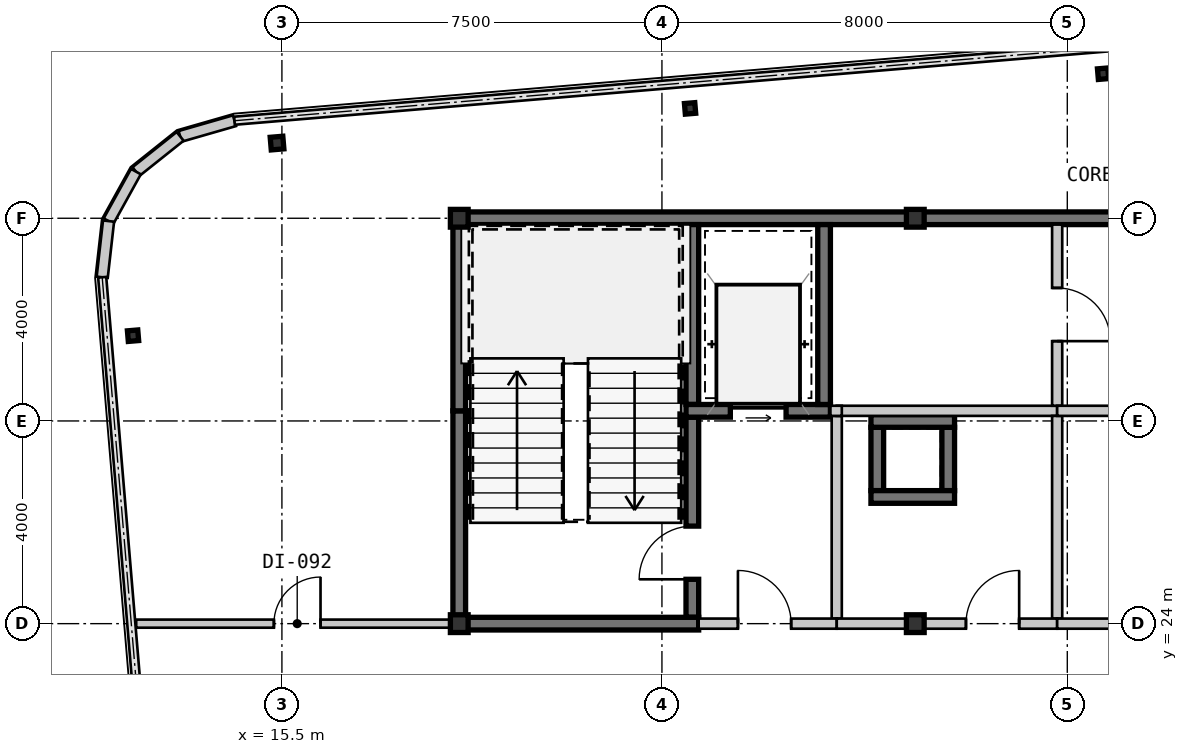
"""IFC4 building model, lengths in metres.
Left out: names, types, materials, properties, quantities, classifications, styles, units other than length and angle.
Written with IfcOpenShell. Run it as: python <this file> out.ifc"""

import sys

from ifc_helpers import new_model, si_unit, direction, frame, frame_2d, origin, origin_2d, place, context, subcontext, project, spatial, rectangle, hollow_rectangle, i_section, extrude, source, transform, mapped, element, fill, save


model = new_model("IFC4")
c1 = context("Model", 3, precision=1e-05, world=origin(), true_north=direction((0.0, 1.0)))
c2 = subcontext(c1, "Body", "Model", "MODEL_VIEW")
j1 = project(units=[si_unit("LENGTHUNIT", "METRE"), si_unit("PLANEANGLEUNIT", "RADIAN")], contexts=[c1])
p1 = place(None, origin())
s1 = spatial("IfcSite", under=j1, at=p1, CompositionType="ELEMENT")
p2 = place(p1, origin())
s2 = spatial("IfcBuilding", under=s1, at=p2, CompositionType="ELEMENT")
p3 = place(p2, frame((0.0, 0.0, 178.85)))
s3 = spatial("IfcBuildingStorey", under=s2, at=p3, CompositionType="ELEMENT", Elevation=178.85)
m1 = source(origin(), c2, "Body", "SweptSolid", [
    extrude(hollow_rectangle(XDim=0.35, YDim=0.35, WallThickness=0.016, at=origin_2d()), origin(), (0.0, 0.0, 1.0), 3.15),
])
for number, where, z_axis, x_axis in (
    (1, (19.0, 24.0, 0.0), (0.0, 0.0, 1.0), (1.0, 0.0, 0.0)),
    (2, (28.0, 24.0, 0.0), (0.0, 0.0, 1.0), (1.0, 0.0, 0.0)),
    (3, (19.0, 32.0, 0.0), (0.0, 0.0, 1.0), (1.0, 0.0, 0.0)),
    (4, (28.0, 32.0, 0.0), (0.0, 0.0, 1.0), (1.0, 0.0, 0.0)),
):
    element("IfcColumn", number, at=place(p3, frame(where, z_axis=z_axis, x_axis=x_axis)), inside=s3, PredefinedType="COLUMN", context=c2, shape_type="MappedRepresentation", body=[
        mapped(m1, transform((0.0, 0.0, 0.0), scale=1.0)),
    ])
m2 = source(origin(), c2, "Body", "SweptSolid", [
    extrude(hollow_rectangle(XDim=0.25, YDim=0.25, WallThickness=0.01, at=origin_2d()), origin(), (0.0, 0.0, 1.0), 3.15),
])
p4 = place(p3, frame((15.404, 33.484, 0.0), z_axis=(0.0, 0.0, 1.0), x_axis=(0.99649285925, 0.083677843332, 0.0)))
e5 = element("IfcColumn", 5, at=p4, inside=s3, PredefinedType="COLUMN", context=c2, shape_type="MappedRepresentation", body=[
    mapped(m2, transform((0.0, 0.0, 0.0), scale=1.0)),
])
m3 = source(origin(), c2, "Body", "SweptSolid", [
    extrude(i_section(OverallWidth=0.205, OverallDepth=0.21, WebThickness=0.009, FlangeThickness=0.014, at=origin_2d()), origin(), (0.0, 0.0, 1.0), 3.15),
])
for number, where, z_axis, x_axis in (
    (6, (23.555, 34.168, 0.0), (0.0, 0.0, 1.0), (0.996, 0.084, 0.0)),
    (7, (31.706, 34.853, 0.0), (0.0, 0.0, 1.0), (0.996, 0.084, 0.0)),
    (8, (12.562, 29.682, 0.0), (0.0, 0.0, 1.0), (0.996, 0.084, 0.0)),
):
    element("IfcColumn", number, at=place(p3, frame(where, z_axis=z_axis, x_axis=x_axis)), inside=s3, PredefinedType="COLUMN", context=c2, shape_type="MappedRepresentation", body=[
        mapped(m3, transform((0.0, 0.0, 0.0), scale=1.0)),
    ])
m4 = source(origin(), c2, "Body", "SweptSolid", [
    extrude(rectangle(XDim=1.116, YDim=0.22, at=frame_2d((0.558, 0.0))), origin(), (0.0, 0.0, 1.0), 2.93),
])
p5 = place(p3, frame((14.564, 33.925, 0.0), z_axis=(0.0, 0.0, 1.0), x_axis=(-0.961010464297, -0.276512002475, 0.0)))
e9 = element("IfcWall", 9, at=p5, inside=s3, PredefinedType="SOLIDWALL", context=c2, shape_type="MappedRepresentation", body=[
    mapped(m4, transform((0.0, 0.0, 0.0), scale=1.0)),
])
m5 = source(origin(), c2, "Body", "SweptSolid", [
    extrude(rectangle(XDim=1.116, YDim=0.22, at=frame_2d((0.558, 0.0))), origin(), (0.0, 0.0, 1.0), 2.93),
])
p6 = place(p3, frame((13.491, 33.616, 0.0), z_axis=(0.0, 0.0, 1.0), x_axis=(-0.782062884215, -0.623199522732, 0.0)))
e10 = element("IfcWall", 10, at=p6, inside=s3, PredefinedType="SOLIDWALL", context=c2, shape_type="MappedRepresentation", body=[
    mapped(m5, transform((0.0, 0.0, 0.0), scale=1.0)),
])
for number, where, z_axis, x_axis in (
    (11, (12.619, 32.921, 0.0), (0.0, 0.0, 1.0), (-0.484, -0.875, 0.0)),
    (12, (12.079, 31.944, 0.0), (0.0, 0.0, 1.0), (-0.112, -0.994, 0.0)),
):
    element("IfcWall", number, at=place(p3, frame(where, z_axis=z_axis, x_axis=x_axis)), inside=s3, PredefinedType="SOLIDWALL", context=c2, shape_type="MappedRepresentation", body=[
        mapped(m4, transform((0.0, 0.0, 0.0), scale=1.0)),
    ])
m6 = source(origin(), c2, "Body", "SweptSolid", [
    extrude(rectangle(XDim=9.125, YDim=0.25, at=frame_2d((4.562, 0.0))), origin(), (0.0, 0.0, 1.0), 2.93),
])
p7 = place(p3, frame((18.875, 32.0, 0.0), z_axis=(0.0, 0.0, 1.0), x_axis=(1.0, 0.0, 0.0)))
e13 = element("IfcWall", 13, at=p7, inside=s3, PredefinedType="SHEAR", context=c2, shape_type="MappedRepresentation", body=[
    mapped(m6, transform((0.0, 0.0, 0.0), scale=1.0)),
])
m7 = source(origin(), c2, "Body", "SweptSolid", [
    extrude(rectangle(XDim=11.2, YDim=0.25, at=frame_2d((5.6, 0.0))), origin(), (0.0, 0.0, 1.0), 2.93),
])
p8 = place(p3, frame((28.0, 32.0, 0.0), z_axis=(0.0, 0.0, 1.0), x_axis=(1.0, 0.0, 0.0)))
e14 = element("IfcWall", 14, at=p8, inside=s3, PredefinedType="SHEAR", context=c2, shape_type="MappedRepresentation", body=[
    mapped(m7, transform((0.0, 0.0, 0.0), scale=1.0)),
])
m8 = source(origin(), c2, "Body", "SweptSolid", [
    extrude(rectangle(XDim=4.075, YDim=0.25, at=frame_2d((2.038, 0.0))), origin(), (0.0, 0.0, 1.0), 2.93),
])
p9 = place(p3, frame((19.0, 24.125, 0.0), z_axis=(0.0, 0.0, 1.0), x_axis=(0.0, 1.0, 0.0)))
e15 = element("IfcWall", 15, at=p9, inside=s3, PredefinedType="SHEAR", context=c2, shape_type="MappedRepresentation", body=[
    mapped(m8, transform((0.0, 0.0, 0.0), scale=1.0)),
])
m9 = source(origin(), c2, "Body", "SweptSolid", [
    extrude(rectangle(XDim=3.675, YDim=0.25, at=frame_2d((1.837, 0.0))), origin(), (0.0, 0.0, 1.0), 2.93),
])
p10 = place(p3, frame((19.0, 28.2, 0.0), z_axis=(0.0, 0.0, 1.0), x_axis=(0.0, 1.0, 0.0)))
e16 = element("IfcWall", 16, at=p10, inside=s3, PredefinedType="SHEAR", context=c2, shape_type="MappedRepresentation", body=[
    mapped(m9, transform((0.0, 0.0, 0.0), scale=1.0)),
])
m10 = source(origin(), c2, "Body", "SweptSolid", [
    extrude(rectangle(XDim=3.55, YDim=0.25, at=frame_2d((1.775, 0.0))), origin(), (0.0, 0.0, 1.0), 2.93),
])
p11 = place(p3, frame((23.6, 28.325, 0.0), z_axis=(0.0, 0.0, 1.0), x_axis=(0.0, 1.0, 0.0)))
e17 = element("IfcWall", 17, at=p11, inside=s3, PredefinedType="SHEAR", context=c2, shape_type="MappedRepresentation", body=[
    mapped(m10, transform((0.0, 0.0, 0.0), scale=1.0)),
])
m11 = source(origin(), c2, "Body", "SweptSolid", [
    extrude(rectangle(XDim=3.95, YDim=0.25, at=frame_2d((1.975, 0.0))), origin(), (0.0, 0.0, 1.0), 2.93),
])
p12 = place(p3, frame((23.6, 24.125, 0.0), z_axis=(0.0, 0.0, 1.0), x_axis=(0.0, 1.0, 0.0)))
e18 = element("IfcWall", 18, at=p12, inside=s3, PredefinedType="SHEAR", context=c2, shape_type="MappedRepresentation", body=[
    mapped(m11, transform((0.0, 0.0, 0.0), scale=1.0)),
])
m12 = source(origin(), c2, "Body", "SweptSolid", [
    extrude(rectangle(XDim=1.05, YDim=2.1, at=frame_2d((0.525, 1.05))), frame((0.0, 0.135, 0.0), z_axis=(0.0, -1.0, 0.0), x_axis=(1.0, 0.0, 0.0)), (0.0, 0.0, 1.0), 0.27),
])
p13 = place(p12, frame((0.75, 0.0, 0.0)))
e19 = element("IfcOpeningElement", 19, at=p13, cuts=e18, PredefinedType="OPENING", context=c2, shape_type="MappedRepresentation", body=[
    mapped(m12, transform((0.0, 0.0, 0.0), scale=1.0)),
])
m13 = source(origin(), c2, "Body", "SweptSolid", [
    extrude(rectangle(XDim=4.85, YDim=0.25, at=frame_2d((2.425, 0.0))), origin(), (0.0, 0.0, 1.0), 2.93),
])
p14 = place(p3, frame((18.875, 24.0, 0.0), z_axis=(0.0, 0.0, 1.0), x_axis=(1.0, 0.0, 0.0)))
e20 = element("IfcWall", 20, at=p14, inside=s3, PredefinedType="SHEAR", context=c2, shape_type="MappedRepresentation", body=[
    mapped(m13, transform((0.0, 0.0, 0.0), scale=1.0)),
])
m14 = source(origin(), c2, "Body", "SweptSolid", [
    extrude(rectangle(XDim=2.85, YDim=0.25, at=frame_2d((1.425, 0.0))), origin(), (0.0, 0.0, 1.0), 2.93),
])
p15 = place(p3, frame((23.475, 28.2, 0.0), z_axis=(0.0, 0.0, 1.0), x_axis=(1.0, 0.0, 0.0)))
e21 = element("IfcWall", 21, at=p15, inside=s3, PredefinedType="SHEAR", context=c2, shape_type="MappedRepresentation", body=[
    mapped(m14, transform((0.0, 0.0, 0.0), scale=1.0)),
])
m15 = source(origin(), c2, "Body", "SweptSolid", [
    extrude(rectangle(XDim=1.1, YDim=2.15, at=frame_2d((0.55, 1.075))), frame((0.0, 0.135, 0.0), z_axis=(0.0, -1.0, 0.0), x_axis=(1.0, 0.0, 0.0)), (0.0, 0.0, 1.0), 0.27),
])
p16 = place(p15, frame((0.875, 0.0, 0.0)))
e22 = element("IfcOpeningElement", 22, at=p16, cuts=e21, PredefinedType="OPENING", context=c2, shape_type="MappedRepresentation", body=[
    mapped(m15, transform((0.0, 0.0, 0.0), scale=1.0)),
])
p17 = place(p3, frame((26.2, 28.325, 0.0), z_axis=(0.0, 0.0, 1.0), x_axis=(0.0, 1.0, 0.0)))
e23 = element("IfcWall", 23, at=p17, inside=s3, PredefinedType="SHEAR", context=c2, shape_type="MappedRepresentation", body=[
    mapped(m10, transform((0.0, 0.0, 0.0), scale=1.0)),
])
m16 = source(origin(), c2, "Body", "SweptSolid", [
    extrude(rectangle(XDim=4.0, YDim=0.2, at=frame_2d((2.0, 0.0))), origin(), (0.0, 0.0, 1.0), 2.93),
])
p18 = place(p3, frame((26.45, 24.1, 0.0), z_axis=(0.0, 0.0, 1.0), x_axis=(0.0, 1.0, 0.0)))
e24 = element("IfcWall", 24, at=p18, inside=s3, PredefinedType="SOLIDWALL", context=c2, shape_type="MappedRepresentation", body=[
    mapped(m16, transform((0.0, 0.0, 0.0), scale=1.0)),
])
m17 = source(origin(), c2, "Body", "SweptSolid", [
    extrude(rectangle(XDim=2.725, YDim=0.2, at=frame_2d((1.362, 0.0))), origin(), (0.0, 0.0, 1.0), 2.47),
])
p19 = place(p3, frame((23.725, 24.0, 0.0), z_axis=(0.0, 0.0, 1.0), x_axis=(1.0, 0.0, 0.0)))
e25 = element("IfcWall", 25, at=p19, inside=s3, PredefinedType="SOLIDWALL", context=c2, shape_type="MappedRepresentation", body=[
    mapped(m17, transform((0.0, 0.0, 0.0), scale=1.0)),
])
m18 = source(origin(), c2, "Body", "SweptSolid", [
    extrude(rectangle(XDim=1.05, YDim=2.1, at=frame_2d((0.525, 1.05))), frame((0.0, 0.11, 0.0), z_axis=(0.0, -1.0, 0.0), x_axis=(1.0, 0.0, 0.0)), (0.0, 0.0, 1.0), 0.22),
])
p20 = place(p19, frame((0.775, 0.0, 0.0)))
e26 = element("IfcOpeningElement", 26, at=p20, cuts=e25, PredefinedType="OPENING", context=c2, shape_type="MappedRepresentation", body=[
    mapped(m18, transform((0.0, 0.0, 0.0), scale=1.0)),
])
m19 = source(origin(), c2, "Body", "SweptSolid", [
    extrude(rectangle(XDim=1.25, YDim=0.25, at=frame_2d((0.625, 0.0))), origin(), (0.0, 0.0, 1.0), 2.93),
])
for number, where, z_axis, x_axis in (
    (27, (28.65, 26.625, 0.0), (0.0, 0.0, 1.0), (0.0, 1.0, 0.0)),
    (28, (27.25, 27.875, 0.0), (0.0, 0.0, 1.0), (0.0, -1.0, 0.0)),
):
    element("IfcWall", number, at=place(p3, frame(where, z_axis=z_axis, x_axis=x_axis)), inside=s3, PredefinedType="SHEAR", context=c2, shape_type="MappedRepresentation", body=[
        mapped(m19, transform((0.0, 0.0, 0.0), scale=1.0)),
    ])
m20 = source(origin(), c2, "Body", "SweptSolid", [
    extrude(rectangle(XDim=1.65, YDim=0.25, at=frame_2d((0.825, 0.0))), origin(), (0.0, 0.0, 1.0), 2.93),
])
for number, where, z_axis, x_axis in (
    (29, (28.775, 28.0, 0.0), (0.0, 0.0, 1.0), (-1.0, 0.0, 0.0)),
    (30, (27.125, 26.5, 0.0), (0.0, 0.0, 1.0), (1.0, 0.0, 0.0)),
):
    element("IfcWall", number, at=place(p3, frame(where, z_axis=z_axis, x_axis=x_axis)), inside=s3, PredefinedType="SHEAR", context=c2, shape_type="MappedRepresentation", body=[
        mapped(m20, transform((0.0, 0.0, 0.0), scale=1.0)),
    ])
m21 = source(origin(), c2, "Body", "SweptSolid", [
    extrude(rectangle(XDim=4.35, YDim=0.2, at=frame_2d((2.175, 0.0))), origin(), (0.0, 0.0, 1.0), 2.93),
])
p21 = place(p3, frame((26.45, 28.2, 0.0), z_axis=(0.0, 0.0, 1.0), x_axis=(1.0, 0.0, 0.0)))
e31 = element("IfcWall", 31, at=p21, inside=s3, PredefinedType="SOLIDWALL", context=c2, shape_type="MappedRepresentation", body=[
    mapped(m21, transform((0.0, 0.0, 0.0), scale=1.0)),
])
p22 = place(p3, frame((30.8, 28.1, 0.0), z_axis=(0.0, 0.0, 1.0), x_axis=(0.0, -1.0, 0.0)))
e32 = element("IfcWall", 32, at=p22, inside=s3, PredefinedType="SOLIDWALL", context=c2, shape_type="MappedRepresentation", body=[
    mapped(m16, transform((0.0, 0.0, 0.0), scale=1.0)),
])
m22 = source(origin(), c2, "Body", "SweptSolid", [
    extrude(rectangle(XDim=4.35, YDim=0.2, at=frame_2d((2.175, 0.0))), origin(), (0.0, 0.0, 1.0), 2.47),
])
p23 = place(p3, frame((30.8, 24.0, 0.0), z_axis=(0.0, 0.0, 1.0), x_axis=(-1.0, 0.0, 0.0)))
e33 = element("IfcWall", 33, at=p23, inside=s3, PredefinedType="SOLIDWALL", context=c2, shape_type="MappedRepresentation", body=[
    mapped(m22, transform((0.0, 0.0, 0.0), scale=1.0)),
])
p24 = place(p23, frame((0.75, 0.0, 0.0)))
e34 = element("IfcOpeningElement", 34, at=p24, cuts=e33, PredefinedType="OPENING", context=c2, shape_type="MappedRepresentation", body=[
    mapped(m18, transform((0.0, 0.0, 0.0), scale=1.0)),
])
m23 = source(origin(), c2, "Body", "SweptSolid", [
    extrude(rectangle(XDim=3.575, YDim=0.2, at=frame_2d((1.788, 0.0))), origin(), (0.0, 0.0, 1.0), 2.93),
])
p25 = place(p3, frame((30.8, 31.875, 0.0), z_axis=(0.0, 0.0, 1.0), x_axis=(0.0, -1.0, 0.0)))
e35 = element("IfcWall", 35, at=p25, inside=s3, PredefinedType="SOLIDWALL", context=c2, shape_type="MappedRepresentation", body=[
    mapped(m23, transform((0.0, 0.0, 0.0), scale=1.0)),
])
p26 = place(p25, frame((1.25, 0.0, 0.0)))
e36 = element("IfcOpeningElement", 36, at=p26, cuts=e35, PredefinedType="OPENING", context=c2, shape_type="MappedRepresentation", body=[
    mapped(m18, transform((0.0, 0.0, 0.0), scale=1.0)),
])
m24 = source(origin(), c2, "Body", "SweptSolid", [
    extrude(rectangle(XDim=4.35, YDim=0.2, at=frame_2d((2.175, 0.0))), origin(), (0.0, 0.0, 1.0), 2.93),
])
p27 = place(p3, frame((30.8, 28.2, 0.0), z_axis=(0.0, 0.0, 1.0), x_axis=(1.0, 0.0, 0.0)))
e37 = element("IfcWall", 37, at=p27, inside=s3, PredefinedType="SOLIDWALL", context=c2, shape_type="MappedRepresentation", body=[
    mapped(m24, transform((0.0, 0.0, 0.0), scale=1.0)),
])
p28 = place(p27, frame((2.88, 0.0, 0.0)))
e38 = element("IfcOpeningElement", 38, at=p28, cuts=e37, PredefinedType="OPENING", context=c2, shape_type="MappedRepresentation", body=[
    mapped(m18, transform((0.0, 0.0, 0.0), scale=1.0)),
])
m25 = source(origin(), c2, "Body", "SweptSolid", [
    extrude(rectangle(XDim=4.35, YDim=0.2, at=frame_2d((2.175, 0.0))), origin(), (0.0, 0.0, 1.0), 2.47),
])
p29 = place(p3, frame((35.15, 24.0, 0.0), z_axis=(0.0, 0.0, 1.0), x_axis=(-1.0, 0.0, 0.0)))
e39 = element("IfcWall", 39, at=p29, inside=s3, PredefinedType="SOLIDWALL", context=c2, shape_type="MappedRepresentation", body=[
    mapped(m25, transform((0.0, 0.0, 0.0), scale=1.0)),
])
p30 = place(p29, frame((1.65, 0.0, 0.0)))
e40 = element("IfcOpeningElement", 40, at=p30, cuts=e39, PredefinedType="OPENING", context=c2, shape_type="MappedRepresentation", body=[
    mapped(m18, transform((0.0, 0.0, 0.0), scale=1.0)),
])
m26 = source(origin(), c2, "Body", "SweptSolid", [
    extrude(rectangle(XDim=6.251, YDim=0.16, at=frame_2d((3.125, 0.0))), origin(), (0.0, 0.0, 1.0), 2.93),
])
p31 = place(p3, frame((12.624, 24.0, 0.0), z_axis=(0.0, 0.0, 1.0), x_axis=(1.0, 0.0, 0.0)))
e41 = element("IfcWall", 41, at=p31, inside=s3, PredefinedType="PARTITIONING", context=c2, shape_type="MappedRepresentation", body=[
    mapped(m26, transform((0.0, 0.0, 0.0), scale=1.0)),
])
m27 = source(origin(), c2, "Body", "SweptSolid", [
    extrude(rectangle(XDim=0.92, YDim=2.1, at=frame_2d((0.46, 1.05))), frame((0.0, 0.09, 0.0), z_axis=(0.0, -1.0, 0.0), x_axis=(1.0, 0.0, 0.0)), (0.0, 0.0, 1.0), 0.18),
])
p32 = place(p31, frame((2.718, 0.0, 0.0)))
e42 = element("IfcOpeningElement", 42, at=p32, cuts=e41, PredefinedType="OPENING", context=c2, shape_type="MappedRepresentation", body=[
    mapped(m27, transform((0.0, 0.0, 0.0), scale=1.0)),
])
m28 = source(origin(), c2, "Body", "SweptSolid", [
    extrude(rectangle(XDim=0.225, YDim=0.2, at=frame_2d((0.113, 0.0))), origin(), (0.0, 0.0, 1.0), 2.93),
])
p33 = place(p3, frame((26.325, 28.2, 0.0), z_axis=(0.0, 0.0, 1.0), x_axis=(1.0, 0.0, 0.0)))
e43 = element("IfcWall", 43, at=p33, inside=s3, PredefinedType="SOLIDWALL", context=c2, shape_type="MappedRepresentation", body=[
    mapped(m28, transform((0.0, 0.0, 0.0), scale=1.0)),
])
m29 = source(origin(), c2, "Body", "SweptSolid", [
    extrude(rectangle(XDim=1.05, YDim=2.1, at=frame_2d((0.525, 1.05))), frame((0.0, 0.025, 0.0), z_axis=(0.0, -1.0, 0.0), x_axis=(1.0, 0.0, 0.0)), (0.0, 0.0, 1.0), 0.05),
])
p34 = place(p13, origin())
e44 = element("IfcDoor", 44, at=p34, inside=s3, OperationType="SINGLE_SWING_LEFT", PredefinedType="DOOR", context=c2, shape_type="MappedRepresentation", body=[
    mapped(m29, transform((0.0, 0.0, 0.0), scale=1.0)),
])
fill(e19, e44)
m30 = source(origin(), c2, "Body", "SweptSolid", [
    extrude(rectangle(XDim=1.1, YDim=2.15, at=frame_2d((0.55, 1.075))), frame((0.0, 0.025, 0.0), z_axis=(0.0, -1.0, 0.0), x_axis=(1.0, 0.0, 0.0)), (0.0, 0.0, 1.0), 0.05),
])
p35 = place(p16, origin())
e45 = element("IfcDoor", 45, at=p35, inside=s3, OperationType="SLIDING_TO_LEFT", PredefinedType="DOOR", context=c2, shape_type="MappedRepresentation", body=[
    mapped(m30, transform((0.0, 0.0, 0.0), scale=1.0)),
])
fill(e22, e45)
p36 = place(p20, origin())
e46 = element("IfcDoor", 46, at=p36, inside=s3, OperationType="SINGLE_SWING_LEFT", PredefinedType="DOOR", context=c2, shape_type="MappedRepresentation", body=[
    mapped(m29, transform((0.0, 0.0, 0.0), scale=1.0)),
])
fill(e26, e46)
p37 = place(p24, frame((1.05, 0.0, 0.0), z_axis=(0.0, 0.0, 1.0), x_axis=(-1.0, 0.0, 0.0)))
e47 = element("IfcDoor", 47, at=p37, inside=s3, OperationType="SINGLE_SWING_RIGHT", PredefinedType="DOOR", context=c2, shape_type="MappedRepresentation", body=[
    mapped(m29, transform((0.0, 0.0, 0.0), scale=1.0)),
])
fill(e34, e47)
p38 = place(p26, origin())
e48 = element("IfcDoor", 48, at=p38, inside=s3, OperationType="SINGLE_SWING_RIGHT", PredefinedType="DOOR", context=c2, shape_type="MappedRepresentation", body=[
    mapped(m29, transform((0.0, 0.0, 0.0), scale=1.0)),
])
fill(e36, e48)
m31 = source(origin(), c2, "Body", "SweptSolid", [
    extrude(rectangle(XDim=0.92, YDim=2.1, at=frame_2d((0.46, 1.05))), frame((0.0, 0.025, 0.0), z_axis=(0.0, -1.0, 0.0), x_axis=(1.0, 0.0, 0.0)), (0.0, 0.0, 1.0), 0.05),
])
p39 = place(p32, origin())
e49 = element("IfcDoor", 49, at=p39, inside=s3, OperationType="SINGLE_SWING_RIGHT", PredefinedType="DOOR", context=c2, shape_type="MappedRepresentation", body=[
    mapped(m31, transform((0.0, 0.0, 0.0), scale=1.0)),
])
fill(e42, e49)
save(model, sys.argv[1])
